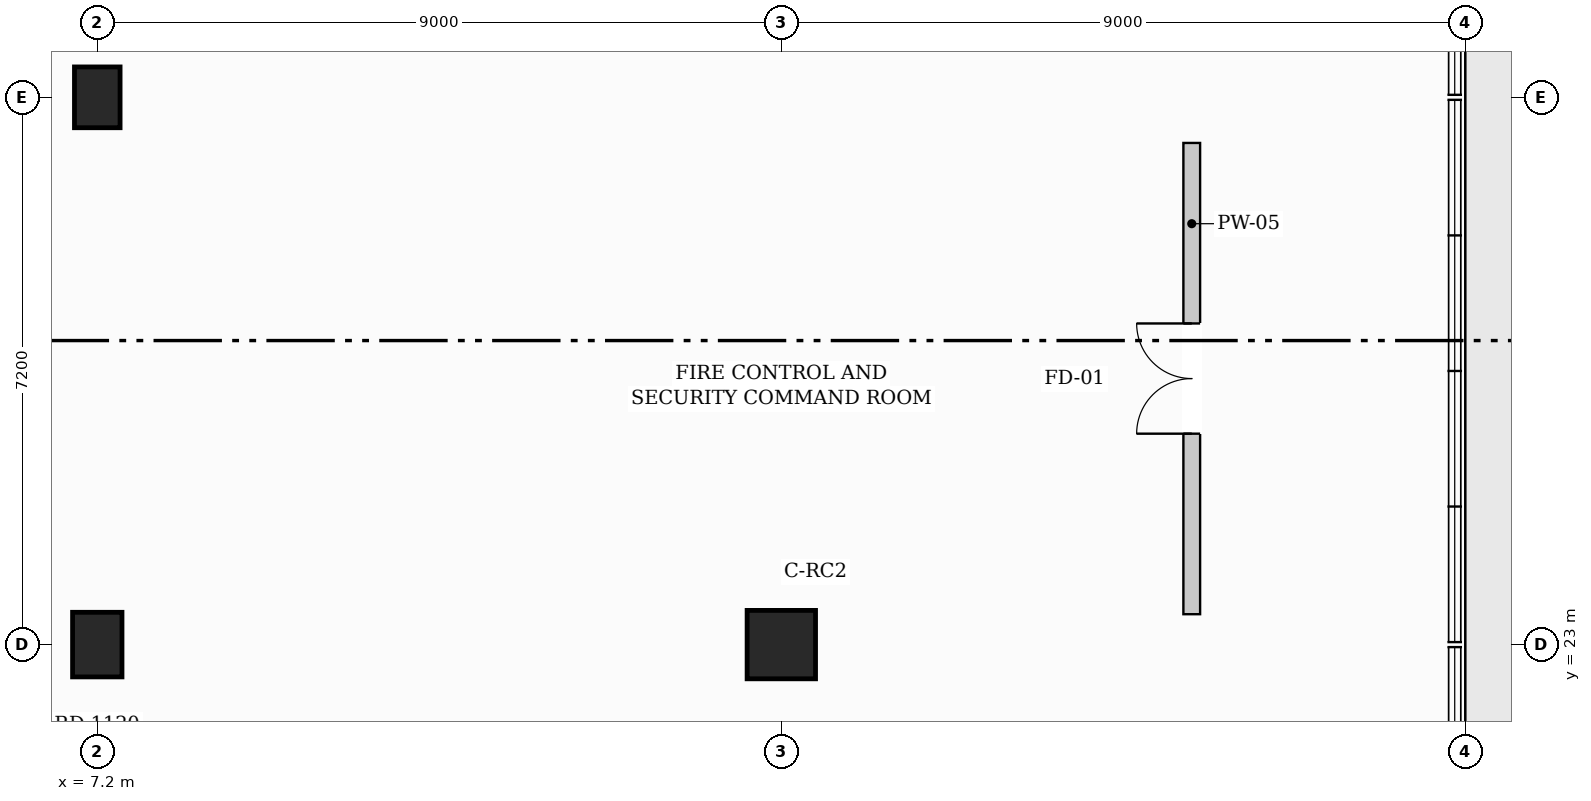
"""IFC4 building model, lengths in metres.
Left out: names, types, materials, properties, quantities, classifications, styles, units other than length and angle.
Written with IfcOpenShell. Run it as: python <this file> out.ifc"""

import sys

from ifc_helpers import new_model, si_unit, direction, frame, frame_2d, origin, origin_2d, place, context, subcontext, project, spatial, rectangle, extrude, element, fill, save


model = new_model("IFC4")
c1 = context("Model", 3, precision=1e-05, world=origin(), true_north=direction((0.0, 1.0)))
c2 = subcontext(c1, "Body", "Model", "MODEL_VIEW")
j1 = project(units=[si_unit("LENGTHUNIT", "METRE"), si_unit("PLANEANGLEUNIT", "RADIAN")], contexts=[c1])
p1 = place(None, origin())
s1 = spatial("IfcSite", under=j1, at=p1, CompositionType="ELEMENT")
p2 = place(p1, origin())
s2 = spatial("IfcBuilding", under=s1, at=p2, CompositionType="ELEMENT")
p3 = place(p2, origin())
s3 = spatial("IfcBuildingStorey", under=s2, at=p3, CompositionType="ELEMENT", Elevation=0.0)
p4 = place(p3, frame((7.2, 23.0, 0.0), z_axis=(0.0, 0.0, 1.0), x_axis=(1.0, 0.0, 0.0)))
e1 = element("IfcColumn", 1, at=p4, inside=s3, PredefinedType="COLUMN", context=c2, shape_type="SweptSolid", body=[
    extrude(rectangle(XDim=0.65, YDim=0.85, at=origin_2d()), origin(), (0.0, 0.0, 1.0), 5.1),
])
p5 = place(p3, frame((7.2, 30.2, 0.0), z_axis=(0.0, 0.0, 1.0), x_axis=(1.0, 0.0, 0.0)))
e2 = element("IfcColumn", 2, at=p5, inside=s3, PredefinedType="COLUMN", context=c2, shape_type="SweptSolid", body=[
    extrude(rectangle(XDim=0.6, YDim=0.8, at=origin_2d()), origin(), (0.0, 0.0, 1.0), 5.1),
])
p6 = place(p3, frame((16.2, 23.0, 0.0), z_axis=(0.0, 0.0, 1.0), x_axis=(1.0, 0.0, 0.0)))
e3 = element("IfcColumn", 3, at=p6, inside=s3, PredefinedType="COLUMN", context=c2, shape_type="SweptSolid", body=[
    extrude(rectangle(XDim=0.9, YDim=0.9, at=origin_2d()), origin(), (0.0, 0.0, 1.0), 5.1),
])
p7 = place(p3, frame((21.6, 23.4, 0.0), z_axis=(0.0, 0.0, 1.0), x_axis=(0.0, 1.0, 0.0)))
e4 = element("IfcWall", 4, at=p7, inside=s3, PredefinedType="PARTITIONING", context=c2, shape_type="SweptSolid", body=[
    extrude(rectangle(XDim=6.2, YDim=0.22, at=frame_2d((3.1, 0.0))), origin(), (0.0, 0.0, 1.0), 4.78),
])
p8 = place(p7, frame((2.375, 0.0, 0.0)))
e5 = element("IfcOpeningElement", 5, at=p8, cuts=e4, PredefinedType="OPENING", context=c2, shape_type="SweptSolid", body=[
    extrude(rectangle(XDim=1.45, YDim=2.2, at=frame_2d((0.725, 1.1))), frame((0.0, 0.12, 0.0), z_axis=(0.0, -1.0, 0.0), x_axis=(1.0, 0.0, 0.0)), (0.0, 0.0, 1.0), 0.24),
])
p9 = place(p8, origin())
e6 = element("IfcDoor", 6, at=p9, inside=s3, OperationType="DOUBLE_DOOR_SINGLE_SWING", PredefinedType="DOOR", context=c2, shape_type="SweptSolid", body=[
    extrude(rectangle(XDim=1.45, YDim=2.2, at=frame_2d((0.725, 1.1))), frame((0.0, 0.025, 0.0), z_axis=(0.0, -1.0, 0.0), x_axis=(1.0, 0.0, 0.0)), (0.0, 0.0, 1.0), 0.05),
])
fill(e5, e6)
save(model, sys.argv[1])
